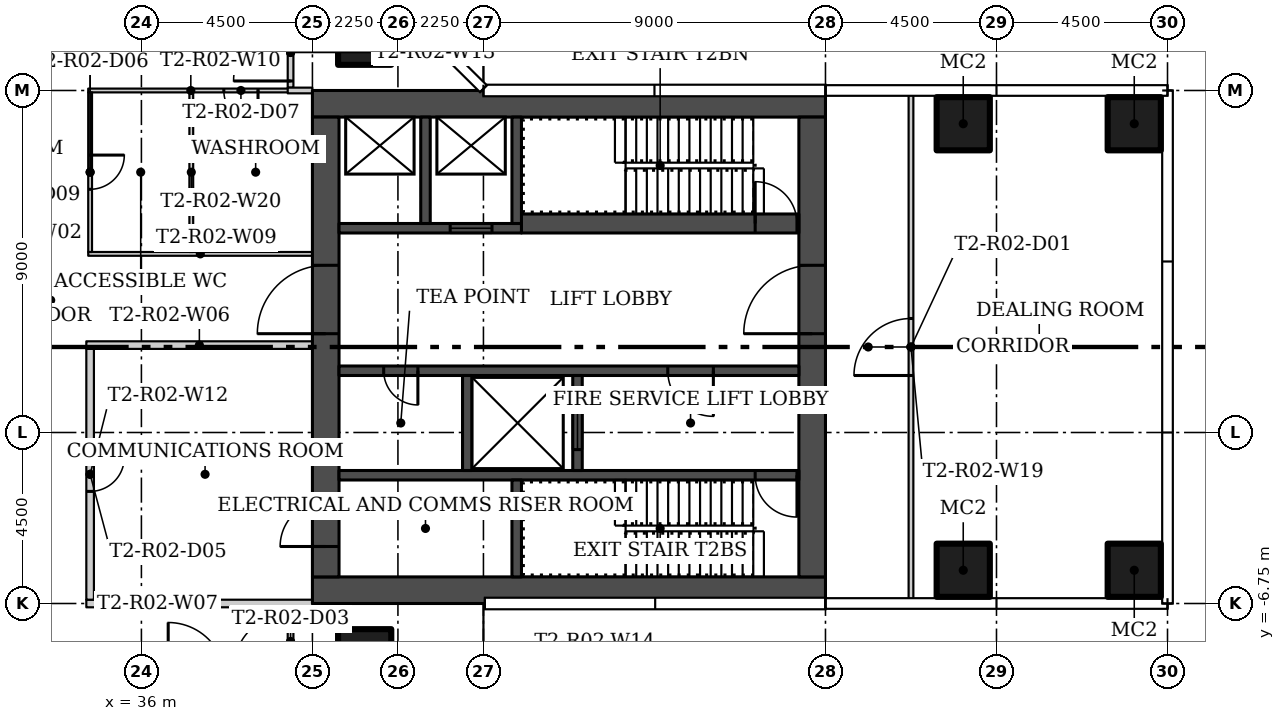
"""IFC4 building model, lengths in metres.
Left out: names, types, materials, properties, quantities, classifications, styles, units other than length and angle.
Written with IfcOpenShell. Run it as: python <this file> out.ifc"""

import sys

from ifc_helpers import new_model, si_unit, direction, frame, frame_2d, origin, origin_2d, place, context, subcontext, project, spatial, rectangle, hollow_rectangle, extrude, element, fill, save


model = new_model("IFC4")
c1 = context("Model", 3, precision=1e-05, world=origin(), true_north=direction((0.0, 1.0)))
c2 = subcontext(c1, "Body", "Model", "MODEL_VIEW")
j1 = project(units=[si_unit("LENGTHUNIT", "METRE"), si_unit("PLANEANGLEUNIT", "RADIAN")], contexts=[c1])
p1 = place(None, origin())
s1 = spatial("IfcSite", under=j1, at=p1, CompositionType="ELEMENT")
p2 = place(p1, origin())
s2 = spatial("IfcBuilding", under=s1, at=p2, CompositionType="ELEMENT")
p3 = place(p2, frame((0.0, 0.0, 33.0)))
s3 = spatial("IfcBuildingStorey", under=s2, at=p3, CompositionType="ELEMENT", Elevation=33.0)
for number, where in (
    (1, (41.875, 8.125, 0.0)),
    (2, (41.875, -8.125, 0.0)),
    (3, (57.625, -5.875, 0.0)),
    (4, (62.125, -5.875, 0.0)),
    (5, (57.625, 5.875, 0.0)),
    (6, (62.125, 5.875, 0.0)),
):
    element("IfcColumn", number, at=place(p3, frame(where)), inside=s3, PredefinedType="COLUMN", context=c2, shape_type="SweptSolid", body=[
        extrude(hollow_rectangle(XDim=1.4, YDim=1.4, WallThickness=0.05, at=origin_2d()), origin(), (0.0, 0.0, 1.0), 4.15),
    ])
p4 = place(p3, frame((40.5, 0.05, 0.0), z_axis=(0.0, 0.0, 1.0), x_axis=(-1.0, 0.0, 0.0)))
e7 = element("IfcWall", 7, at=p4, inside=s3, PredefinedType="PARTITIONING", context=c2, shape_type="SweptSolid", body=[
    extrude(rectangle(XDim=5.95, YDim=0.2, at=frame_2d((2.975, 0.0))), origin(), (0.0, 0.0, 1.0), 4.15),
])
p5 = place(p3, frame((34.55, -6.75, 0.0)))
e8 = element("IfcWall", 8, at=p5, inside=s3, PredefinedType="PARTITIONING", context=c2, shape_type="SweptSolid", body=[
    extrude(rectangle(XDim=5.95, YDim=0.2, at=frame_2d((2.975, 0.0))), origin(), (0.0, 0.0, 1.0), 4.15),
])
p6 = place(p3, frame((34.6, 2.45, 0.0)))
e9 = element("IfcWall", 9, at=p6, inside=s3, PredefinedType="PARTITIONING", context=c2, shape_type="SweptSolid", body=[
    extrude(rectangle(XDim=5.9, YDim=0.1, at=frame_2d((2.95, 0.0))), origin(), (0.0, 0.0, 1.0), 4.15),
])
p7 = place(p3, frame((40.0, 6.75, 0.0), z_axis=(0.0, 0.0, 1.0), x_axis=(-1.0, 0.0, 0.0)))
e10 = element("IfcWall", 10, at=p7, inside=s3, PredefinedType="PARTITIONING", context=c2, shape_type="SweptSolid", body=[
    extrude(rectangle(XDim=5.399, YDim=0.1, at=frame_2d((2.7, 0.0))), origin(), (0.0, 0.0, 1.0), 4.15),
])
p8 = place(p7, frame((0.931, 0.0, 0.0)))
e11 = element("IfcOpeningElement", 11, at=p8, cuts=e10, PredefinedType="OPENING", context=c2, shape_type="SweptSolid", body=[
    extrude(rectangle(XDim=0.9, YDim=2.1, at=frame_2d((0.45, 1.05))), frame((0.0, 0.06, 0.0), z_axis=(0.0, -1.0, 0.0), x_axis=(1.0, 0.0, 0.0)), (0.0, 0.0, 1.0), 0.12),
])
p9 = place(p3, frame((34.65, 6.7, 0.0), z_axis=(0.0, 0.0, 1.0), x_axis=(0.0, -1.0, 0.0)))
e12 = element("IfcWall", 12, at=p9, inside=s3, PredefinedType="PARTITIONING", context=c2, shape_type="SweptSolid", body=[
    extrude(rectangle(XDim=4.2, YDim=0.1, at=frame_2d((2.1, 0.0))), origin(), (0.0, 0.0, 1.0), 4.15),
])
p10 = place(p9, frame((1.65, 0.0, 0.0)))
e13 = element("IfcOpeningElement", 13, at=p10, cuts=e12, PredefinedType="OPENING", context=c2, shape_type="SweptSolid", body=[
    extrude(rectangle(XDim=0.9, YDim=2.1, at=frame_2d((0.45, 1.05))), frame((0.0, 0.06, 0.0), z_axis=(0.0, -1.0, 0.0), x_axis=(1.0, 0.0, 0.0)), (0.0, 0.0, 1.0), 0.12),
])
p11 = place(p3, frame((34.65, -0.05, 0.0), z_axis=(0.0, 0.0, 1.0), x_axis=(0.0, -1.0, 0.0)))
e14 = element("IfcWall", 14, at=p11, inside=s3, PredefinedType="PARTITIONING", context=c2, shape_type="SweptSolid", body=[
    extrude(rectangle(XDim=6.6, YDim=0.2, at=frame_2d((3.3, 0.0))), origin(), (0.0, 0.0, 1.0), 4.15),
])
p12 = place(p11, frame((2.85, 0.0, 0.0)))
e15 = element("IfcOpeningElement", 15, at=p12, cuts=e14, PredefinedType="OPENING", context=c2, shape_type="SweptSolid", body=[
    extrude(rectangle(XDim=0.9, YDim=2.1, at=frame_2d((0.45, 1.05))), frame((0.0, 0.11, 0.0), z_axis=(0.0, -1.0, 0.0), x_axis=(1.0, 0.0, 0.0)), (0.0, 0.0, 1.0), 0.22),
])
p13 = place(p3, frame((39.925, 6.825, 0.0), z_axis=(0.0, 0.0, 1.0), x_axis=(0.0, 1.0, 0.0)))
e16 = element("IfcWall", 16, at=p13, inside=s3, PredefinedType="PARTITIONING", context=c2, shape_type="SweptSolid", body=[
    extrude(rectangle(XDim=1.85, YDim=0.15, at=frame_2d((0.925, 0.0))), origin(), (0.0, 0.0, 1.0), 4.15),
])
p14 = place(p13, frame((0.175, 0.0, 0.0)))
e17 = element("IfcOpeningElement", 17, at=p14, cuts=e16, PredefinedType="OPENING", context=c2, shape_type="SweptSolid", body=[
    extrude(rectangle(XDim=1.5, YDim=2.4, at=frame_2d((0.75, 1.2))), frame((0.0, 0.085, 0.0), z_axis=(0.0, -1.0, 0.0), x_axis=(1.0, 0.0, 0.0)), (0.0, 0.0, 1.0), 0.17),
])
p15 = place(p3, frame((39.925, -8.675, 0.0), z_axis=(0.0, 0.0, 1.0), x_axis=(0.0, 1.0, 0.0)))
e18 = element("IfcWall", 18, at=p15, inside=s3, PredefinedType="PARTITIONING", context=c2, shape_type="SweptSolid", body=[
    extrude(rectangle(XDim=1.825, YDim=0.15, at=frame_2d((0.913, 0.0))), origin(), (0.0, 0.0, 1.0), 4.15),
])
p16 = place(p15, frame((0.175, 0.0, 0.0)))
e19 = element("IfcOpeningElement", 19, at=p16, cuts=e18, PredefinedType="OPENING", context=c2, shape_type="SweptSolid", body=[
    extrude(rectangle(XDim=1.5, YDim=2.4, at=frame_2d((0.75, 1.2))), frame((0.0, 0.085, 0.0), z_axis=(0.0, -1.0, 0.0), x_axis=(1.0, 0.0, 0.0)), (0.0, 0.0, 1.0), 0.17),
])
p17 = place(p3, frame((56.25, -6.655, 0.0), z_axis=(0.0, 0.0, 1.0), x_axis=(0.0, 1.0, 0.0)))
e20 = element("IfcWall", 20, at=p17, inside=s3, PredefinedType="PARTITIONING", context=c2, shape_type="SweptSolid", body=[
    extrude(rectangle(XDim=13.31, YDim=0.125, at=frame_2d((6.655, 0.0))), origin(), (0.0, 0.0, 1.0), 4.15),
])
p18 = place(p17, frame((5.905, 0.0, 0.0)))
e21 = element("IfcOpeningElement", 21, at=p18, cuts=e20, PredefinedType="OPENING", context=c2, shape_type="SweptSolid", body=[
    extrude(rectangle(XDim=1.5, YDim=2.1, at=frame_2d((0.75, 1.05))), frame((0.0, 0.073, 0.0), z_axis=(0.0, -1.0, 0.0), x_axis=(1.0, 0.0, 0.0)), (0.0, 0.0, 1.0), 0.145),
])
p19 = place(p3, frame((37.312, 6.7, 0.0), z_axis=(0.0, 0.0, 1.0), x_axis=(0.0, -1.0, 0.0)))
e22 = element("IfcWall", 22, at=p19, inside=s3, PredefinedType="PARTITIONING", context=c2, shape_type="SweptSolid", body=[
    extrude(rectangle(XDim=4.2, YDim=0.1, at=frame_2d((2.1, 0.0))), origin(), (0.0, 0.0, 1.0), 4.15),
])
p20 = place(p3, frame((40.5, 6.75, 0.0), z_axis=(0.0, 0.0, 1.0), x_axis=(-1.0, 0.0, 0.0)))
e23 = element("IfcWall", 23, at=p20, inside=s3, PredefinedType="PARTITIONING", context=c2, shape_type="SweptSolid", body=[
    extrude(rectangle(XDim=0.65, YDim=0.15, at=frame_2d((0.325, 0.0))), origin(), (0.0, 0.0, 1.0), 4.15),
])
for number, where, z_axis, x_axis in (
    (24, (54.0, -6.4, 0.0), (0.0, 0.0, 1.0), (-1.0, 0.0, 0.0)),
    (25, (54.0, 6.4, 0.0), (0.0, 0.0, 1.0), (-1.0, 0.0, 0.0)),
):
    element("IfcWall", number, at=place(p3, frame(where, z_axis=z_axis, x_axis=x_axis)), inside=s3, PredefinedType="SHEAR", context=c2, shape_type="SweptSolid", body=[
        extrude(rectangle(XDim=13.5, YDim=0.7, at=frame_2d((6.75, 0.0))), origin(), (0.0, 0.0, 1.0), 4.15),
    ])
p21 = place(p3, frame((53.65, -6.05, 0.0), z_axis=(0.0, 0.0, 1.0), x_axis=(0.0, 1.0, 0.0)))
e26 = element("IfcWall", 26, at=p21, inside=s3, PredefinedType="SHEAR", context=c2, shape_type="SweptSolid", body=[
    extrude(rectangle(XDim=12.1, YDim=0.7, at=frame_2d((6.05, 0.0))), origin(), (0.0, 0.0, 1.0), 4.15),
])
p22 = place(p21, frame((6.4, 0.0, 0.0)))
e27 = element("IfcOpeningElement", 27, at=p22, cuts=e26, PredefinedType="OPENING", context=c2, shape_type="SweptSolid", body=[
    extrude(rectangle(XDim=1.8, YDim=2.4, at=frame_2d((0.9, 1.2))), frame((0.0, 0.36, 0.0), z_axis=(0.0, -1.0, 0.0), x_axis=(1.0, 0.0, 0.0)), (0.0, 0.0, 1.0), 0.72),
])
p23 = place(p3, frame((40.85, -6.05, 0.0), z_axis=(0.0, 0.0, 1.0), x_axis=(0.0, 1.0, 0.0)))
e28 = element("IfcWall", 28, at=p23, inside=s3, PredefinedType="SHEAR", context=c2, shape_type="SweptSolid", body=[
    extrude(rectangle(XDim=12.1, YDim=0.7, at=frame_2d((6.05, 0.0))), origin(), (0.0, 0.0, 1.0), 4.15),
])
p24 = place(p23, frame((0.8, 0.0, 0.0)))
e29 = element("IfcOpeningElement", 29, at=p24, cuts=e28, PredefinedType="OPENING", context=c2, shape_type="SweptSolid", body=[
    extrude(rectangle(XDim=1.2, YDim=2.1, at=frame_2d((0.6, 1.05))), frame((0.0, 0.36, 0.0), z_axis=(0.0, -1.0, 0.0), x_axis=(1.0, 0.0, 0.0)), (0.0, 0.0, 1.0), 0.72),
])
p25 = place(p23, frame((6.4, 0.0, 0.0)))
e30 = element("IfcOpeningElement", 30, at=p25, cuts=e28, PredefinedType="OPENING", context=c2, shape_type="SweptSolid", body=[
    extrude(rectangle(XDim=1.8, YDim=2.4, at=frame_2d((0.9, 1.2))), frame((0.0, 0.36, 0.0), z_axis=(0.0, -1.0, 0.0), x_axis=(1.0, 0.0, 0.0)), (0.0, 0.0, 1.0), 0.72),
])
p26 = place(p3, frame((53.3, -3.375, 0.0), z_axis=(0.0, 0.0, 1.0), x_axis=(-1.0, 0.0, 0.0)))
e31 = element("IfcWall", 31, at=p26, inside=s3, PredefinedType="SHEAR", context=c2, shape_type="SweptSolid", body=[
    extrude(rectangle(XDim=12.1, YDim=0.25, at=frame_2d((6.05, 0.0))), origin(), (0.0, 0.0, 1.0), 4.15),
])
p27 = place(p26, frame((0.05, 0.0, 0.0)))
e32 = element("IfcOpeningElement", 32, at=p27, cuts=e31, PredefinedType="OPENING", context=c2, shape_type="SweptSolid", body=[
    extrude(rectangle(XDim=1.1, YDim=2.1, at=frame_2d((0.55, 1.05))), frame((0.0, 0.135, 0.0), z_axis=(0.0, -1.0, 0.0), x_axis=(1.0, 0.0, 0.0)), (0.0, 0.0, 1.0), 0.27),
])
p28 = place(p3, frame((45.875, -6.05, 0.0), z_axis=(0.0, 0.0, 1.0), x_axis=(0.0, 1.0, 0.0)))
e33 = element("IfcWall", 33, at=p28, inside=s3, PredefinedType="SHEAR", context=c2, shape_type="SweptSolid", body=[
    extrude(rectangle(XDim=2.55, YDim=0.25, at=frame_2d((1.275, 0.0))), origin(), (0.0, 0.0, 1.0), 4.15),
])
p29 = place(p3, frame((53.3, -0.625, 0.0), z_axis=(0.0, 0.0, 1.0), x_axis=(-1.0, 0.0, 0.0)))
e34 = element("IfcWall", 34, at=p29, inside=s3, PredefinedType="SHEAR", context=c2, shape_type="SweptSolid", body=[
    extrude(rectangle(XDim=12.1, YDim=0.25, at=frame_2d((6.05, 0.0))), origin(), (0.0, 0.0, 1.0), 4.15),
])
p30 = place(p29, frame((2.25, 0.0, 0.0)))
e35 = element("IfcOpeningElement", 35, at=p30, cuts=e34, PredefinedType="OPENING", context=c2, shape_type="SweptSolid", body=[
    extrude(rectangle(XDim=1.2, YDim=2.1, at=frame_2d((0.6, 1.05))), frame((0.0, 0.135, 0.0), z_axis=(0.0, -1.0, 0.0), x_axis=(1.0, 0.0, 0.0)), (0.0, 0.0, 1.0), 0.27),
])
p31 = place(p29, frame((10.025, 0.0, 0.0)))
e36 = element("IfcOpeningElement", 36, at=p31, cuts=e34, PredefinedType="OPENING", context=c2, shape_type="SweptSolid", body=[
    extrude(rectangle(XDim=0.9, YDim=2.1, at=frame_2d((0.45, 1.05))), frame((0.0, 0.135, 0.0), z_axis=(0.0, -1.0, 0.0), x_axis=(1.0, 0.0, 0.0)), (0.0, 0.0, 1.0), 0.27),
])
p32 = place(p3, frame((47.475, -3.25, 0.0), z_axis=(0.0, 0.0, 1.0), x_axis=(0.0, 1.0, 0.0)))
e37 = element("IfcWall", 37, at=p32, inside=s3, PredefinedType="SHEAR", context=c2, shape_type="SweptSolid", body=[
    extrude(rectangle(XDim=2.5, YDim=0.25, at=frame_2d((1.25, 0.0))), origin(), (0.0, 0.0, 1.0), 4.15),
])
p33 = place(p32, frame((0.55, 0.0, 0.0)))
e38 = element("IfcOpeningElement", 38, at=p33, cuts=e37, PredefinedType="OPENING", context=c2, shape_type="SweptSolid", body=[
    extrude(rectangle(XDim=1.4, YDim=2.4, at=frame_2d((0.7, 1.2))), frame((0.0, 0.135, 0.0), z_axis=(0.0, -1.0, 0.0), x_axis=(1.0, 0.0, 0.0)), (0.0, 0.0, 1.0), 0.27),
])
p34 = place(p3, frame((44.575, -3.25, 0.0), z_axis=(0.0, 0.0, 1.0), x_axis=(0.0, 1.0, 0.0)))
e39 = element("IfcWall", 39, at=p34, inside=s3, PredefinedType="SHEAR", context=c2, shape_type="SweptSolid", body=[
    extrude(rectangle(XDim=2.5, YDim=0.25, at=frame_2d((1.25, 0.0))), origin(), (0.0, 0.0, 1.0), 4.15),
])
p35 = place(p3, frame((46.0, 3.25, 0.0)))
e40 = element("IfcWall", 40, at=p35, inside=s3, PredefinedType="SHEAR", context=c2, shape_type="SweptSolid", body=[
    extrude(rectangle(XDim=7.3, YDim=0.5, at=frame_2d((3.65, 0.0))), origin(), (0.0, 0.0, 1.0), 4.15),
])
p36 = place(p35, frame((6.15, 0.0, 0.0)))
e41 = element("IfcOpeningElement", 41, at=p36, cuts=e40, PredefinedType="OPENING", context=c2, shape_type="SweptSolid", body=[
    extrude(rectangle(XDim=1.1, YDim=2.1, at=frame_2d((0.55, 1.05))), frame((0.0, 0.26, 0.0), z_axis=(0.0, -1.0, 0.0), x_axis=(1.0, 0.0, 0.0)), (0.0, 0.0, 1.0), 0.52),
])
p37 = place(p3, frame((46.0, 3.125, 0.0), z_axis=(0.0, 0.0, 1.0), x_axis=(-1.0, 0.0, 0.0)))
e42 = element("IfcWall", 42, at=p37, inside=s3, PredefinedType="SHEAR", context=c2, shape_type="SweptSolid", body=[
    extrude(rectangle(XDim=4.8, YDim=0.25, at=frame_2d((2.4, 0.0))), origin(), (0.0, 0.0, 1.0), 4.15),
])
p38 = place(p37, frame((0.775, 0.0, 0.0)))
e43 = element("IfcOpeningElement", 43, at=p38, cuts=e42, PredefinedType="OPENING", context=c2, shape_type="SweptSolid", body=[
    extrude(rectangle(XDim=1.1, YDim=2.1, at=frame_2d((0.55, 1.05))), frame((0.0, 0.135, 0.0), z_axis=(0.0, -1.0, 0.0), x_axis=(1.0, 0.0, 0.0)), (0.0, 0.0, 1.0), 0.27),
])
for number, where, z_axis, x_axis in (
    (44, (45.875, 3.25, 0.0), (0.0, 0.0, 1.0), (0.0, 1.0, 0.0)),
    (45, (43.475, 3.25, 0.0), (0.0, 0.0, 1.0), (0.0, 1.0, 0.0)),
):
    element("IfcWall", number, at=place(p3, frame(where, z_axis=z_axis, x_axis=x_axis)), inside=s3, PredefinedType="SHEAR", context=c2, shape_type="SweptSolid", body=[
        extrude(rectangle(XDim=2.8, YDim=0.25, at=frame_2d((1.4, 0.0))), origin(), (0.0, 0.0, 1.0), 4.15),
    ])
p39 = place(p18, origin())
e46 = element("IfcDoor", 46, at=p39, inside=s3, OperationType="DOUBLE_DOOR_SINGLE_SWING", PredefinedType="DOOR", context=c2, shape_type="SweptSolid", body=[
    extrude(rectangle(XDim=1.5, YDim=2.1, at=frame_2d((0.75, 1.05))), frame((0.0, 0.025, 0.0), z_axis=(0.0, -1.0, 0.0), x_axis=(1.0, 0.0, 0.0)), (0.0, 0.0, 1.0), 0.05),
])
fill(e21, e46)
p40 = place(p16, origin())
e47 = element("IfcDoor", 47, at=p40, inside=s3, OperationType="DOUBLE_DOOR_SINGLE_SWING", PredefinedType="DOOR", context=c2, shape_type="SweptSolid", body=[
    extrude(rectangle(XDim=1.5, YDim=2.4, at=frame_2d((0.75, 1.2))), frame((0.0, 0.025, 0.0), z_axis=(0.0, -1.0, 0.0), x_axis=(1.0, 0.0, 0.0)), (0.0, 0.0, 1.0), 0.05),
])
fill(e19, e47)
p41 = place(p14, origin())
e48 = element("IfcDoor", 48, at=p41, inside=s3, OperationType="DOUBLE_DOOR_SINGLE_SWING", PredefinedType="DOOR", context=c2, shape_type="SweptSolid", body=[
    extrude(rectangle(XDim=1.5, YDim=2.4, at=frame_2d((0.75, 1.2))), frame((0.0, 0.025, 0.0), z_axis=(0.0, -1.0, 0.0), x_axis=(1.0, 0.0, 0.0)), (0.0, 0.0, 1.0), 0.05),
])
fill(e17, e48)
p42 = place(p12, origin())
e49 = element("IfcDoor", 49, at=p42, inside=s3, OperationType="SINGLE_SWING_RIGHT", PredefinedType="DOOR", context=c2, shape_type="SweptSolid", body=[
    extrude(rectangle(XDim=0.9, YDim=2.1, at=frame_2d((0.45, 1.05))), frame((0.0, 0.025, 0.0), z_axis=(0.0, -1.0, 0.0), x_axis=(1.0, 0.0, 0.0)), (0.0, 0.0, 1.0), 0.05),
])
fill(e15, e49)
p43 = place(p10, origin())
e50 = element("IfcDoor", 50, at=p43, inside=s3, OperationType="SINGLE_SWING_RIGHT", PredefinedType="DOOR", context=c2, shape_type="SweptSolid", body=[
    extrude(rectangle(XDim=0.9, YDim=2.1, at=frame_2d((0.45, 1.05))), frame((0.0, 0.025, 0.0), z_axis=(0.0, -1.0, 0.0), x_axis=(1.0, 0.0, 0.0)), (0.0, 0.0, 1.0), 0.05),
])
fill(e13, e50)
p44 = place(p8, origin())
e51 = element("IfcDoor", 51, at=p44, inside=s3, OperationType="SINGLE_SWING_RIGHT", PredefinedType="DOOR", context=c2, shape_type="SweptSolid", body=[
    extrude(rectangle(XDim=0.9, YDim=2.1, at=frame_2d((0.45, 1.05))), frame((0.0, 0.025, 0.0), z_axis=(0.0, -1.0, 0.0), x_axis=(1.0, 0.0, 0.0)), (0.0, 0.0, 1.0), 0.05),
])
fill(e11, e51)
p45 = place(p22, origin())
e52 = element("IfcDoor", 52, at=p45, inside=s3, OperationType="DOUBLE_DOOR_SINGLE_SWING", PredefinedType="DOOR", context=c2, shape_type="SweptSolid", body=[
    extrude(rectangle(XDim=1.8, YDim=2.4, at=frame_2d((0.9, 1.2))), frame((0.0, 0.025, 0.0), z_axis=(0.0, -1.0, 0.0), x_axis=(1.0, 0.0, 0.0)), (0.0, 0.0, 1.0), 0.05),
])
fill(e27, e52)
p46 = place(p24, origin())
e53 = element("IfcDoor", 53, at=p46, inside=s3, OperationType="SINGLE_SWING_LEFT", PredefinedType="DOOR", context=c2, shape_type="SweptSolid", body=[
    extrude(rectangle(XDim=1.2, YDim=2.1, at=frame_2d((0.6, 1.05))), frame((0.0, 0.025, 0.0), z_axis=(0.0, -1.0, 0.0), x_axis=(1.0, 0.0, 0.0)), (0.0, 0.0, 1.0), 0.05),
])
fill(e29, e53)
p47 = place(p25, origin())
e54 = element("IfcDoor", 54, at=p47, inside=s3, OperationType="DOUBLE_DOOR_SINGLE_SWING", PredefinedType="DOOR", context=c2, shape_type="SweptSolid", body=[
    extrude(rectangle(XDim=1.8, YDim=2.4, at=frame_2d((0.9, 1.2))), frame((0.0, 0.025, 0.0), z_axis=(0.0, -1.0, 0.0), x_axis=(1.0, 0.0, 0.0)), (0.0, 0.0, 1.0), 0.05),
])
fill(e30, e54)
p48 = place(p27, origin())
e55 = element("IfcDoor", 55, at=p48, inside=s3, OperationType="SINGLE_SWING_LEFT", PredefinedType="DOOR", context=c2, shape_type="SweptSolid", body=[
    extrude(rectangle(XDim=1.1, YDim=2.1, at=frame_2d((0.55, 1.05))), frame((0.0, 0.025, 0.0), z_axis=(0.0, -1.0, 0.0), x_axis=(1.0, 0.0, 0.0)), (0.0, 0.0, 1.0), 0.05),
])
fill(e32, e55)
p49 = place(p30, origin())
e56 = element("IfcDoor", 56, at=p49, inside=s3, OperationType="SINGLE_SWING_LEFT", PredefinedType="DOOR", context=c2, shape_type="SweptSolid", body=[
    extrude(rectangle(XDim=1.2, YDim=2.1, at=frame_2d((0.6, 1.05))), frame((0.0, 0.025, 0.0), z_axis=(0.0, -1.0, 0.0), x_axis=(1.0, 0.0, 0.0)), (0.0, 0.0, 1.0), 0.05),
])
fill(e35, e56)
p50 = place(p31, origin())
e57 = element("IfcDoor", 57, at=p50, inside=s3, OperationType="SINGLE_SWING_RIGHT", PredefinedType="DOOR", context=c2, shape_type="SweptSolid", body=[
    extrude(rectangle(XDim=0.9, YDim=2.1, at=frame_2d((0.45, 1.05))), frame((0.0, 0.025, 0.0), z_axis=(0.0, -1.0, 0.0), x_axis=(1.0, 0.0, 0.0)), (0.0, 0.0, 1.0), 0.05),
])
fill(e36, e57)
p51 = place(p33, origin())
e58 = element("IfcDoor", 58, at=p51, inside=s3, OperationType="SLIDING_TO_LEFT", PredefinedType="DOOR", context=c2, shape_type="SweptSolid", body=[
    extrude(rectangle(XDim=1.4, YDim=2.4, at=frame_2d((0.7, 1.2))), frame((0.0, 0.025, 0.0), z_axis=(0.0, -1.0, 0.0), x_axis=(1.0, 0.0, 0.0)), (0.0, 0.0, 1.0), 0.05),
])
fill(e38, e58)
p52 = place(p36, origin())
e59 = element("IfcDoor", 59, at=p52, inside=s3, OperationType="SINGLE_SWING_RIGHT", PredefinedType="DOOR", context=c2, shape_type="SweptSolid", body=[
    extrude(rectangle(XDim=1.1, YDim=2.1, at=frame_2d((0.55, 1.05))), frame((0.0, 0.025, 0.0), z_axis=(0.0, -1.0, 0.0), x_axis=(1.0, 0.0, 0.0)), (0.0, 0.0, 1.0), 0.05),
])
fill(e41, e59)
p53 = place(p38, origin())
e60 = element("IfcDoor", 60, at=p53, inside=s3, OperationType="SLIDING_TO_LEFT", PredefinedType="DOOR", context=c2, shape_type="SweptSolid", body=[
    extrude(rectangle(XDim=1.1, YDim=2.1, at=frame_2d((0.55, 1.05))), frame((0.0, 0.025, 0.0), z_axis=(0.0, -1.0, 0.0), x_axis=(1.0, 0.0, 0.0)), (0.0, 0.0, 1.0), 0.05),
])
fill(e43, e60)
save(model, sys.argv[1])
